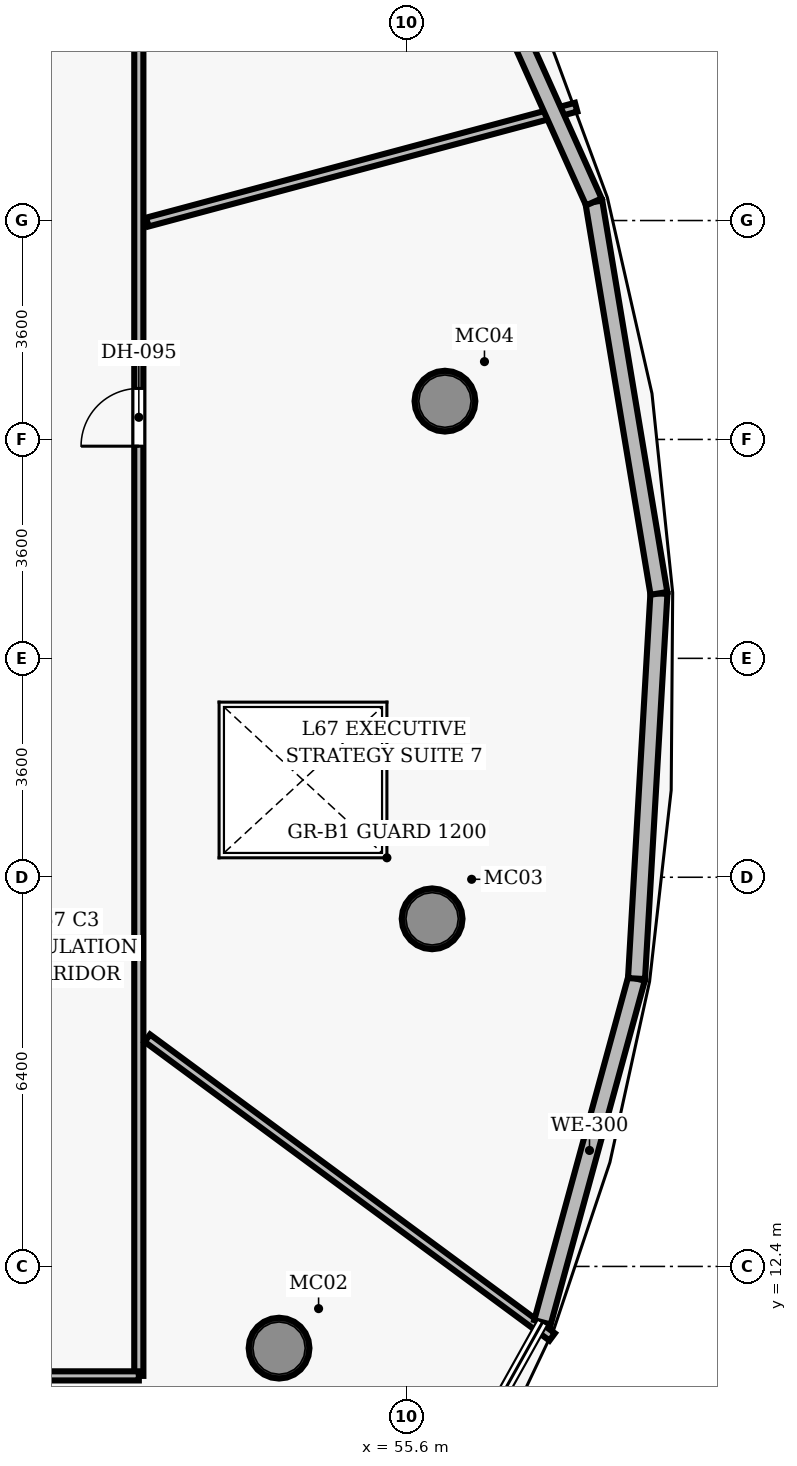
"""IFC4 building model, lengths in metres.
Left out: names, types, materials, properties, quantities, classifications, styles, units other than length and angle.
Written with IfcOpenShell. Run it as: python <this file> out.ifc"""

import sys

from ifc_helpers import new_model, si_unit, direction, frame, frame_2d, origin, origin_2d, place, context, subcontext, project, spatial, rectangle, hollow_circle, extrude, element, fill, save


model = new_model("IFC4")
c1 = context("Model", 3, precision=1e-05, world=origin(), true_north=direction((0.0, 1.0)))
c2 = subcontext(c1, "Body", "Model", "MODEL_VIEW")
j1 = project(units=[si_unit("LENGTHUNIT", "METRE"), si_unit("PLANEANGLEUNIT", "RADIAN")], contexts=[c1])
p1 = place(None, origin())
s1 = spatial("IfcSite", under=j1, at=p1, CompositionType="ELEMENT")
p2 = place(p1, origin())
s2 = spatial("IfcBuilding", under=s1, at=p2, CompositionType="ELEMENT")
p3 = place(p2, frame((0.0, 0.0, 265.15)))
s3 = spatial("IfcBuildingStorey", under=s2, at=p3, CompositionType="ELEMENT", Elevation=265.15)
for number, where, z_axis, x_axis in (
    (1, (53.506, 11.056, 0.0), (0.0, 0.0, 1.0), (1.0, 0.0, 0.0)),
    (2, (56.024, 18.116, 0.0), (0.0, 0.0, 1.0), (1.0, 0.0, 0.0)),
    (3, (56.235, 26.629, 0.0), (0.0, 0.0, 1.0), (1.0, 0.0, 0.0)),
):
    element("IfcColumn", number, at=place(p3, frame(where, z_axis=z_axis, x_axis=x_axis)), inside=s3, PredefinedType="COLUMN", context=c2, shape_type="SweptSolid", body=[
        extrude(hollow_circle(Radius=0.5, WallThickness=0.045, at=origin_2d()), origin(), (0.0, 0.0, 1.0), 3.85),
    ])
p4 = place(p3, frame((51.2, 10.6, 0.0), z_axis=(0.0, 0.0, 1.0), x_axis=(0.0, 1.0, 0.0)))
e4 = element("IfcWall", 4, at=p4, inside=s3, PredefinedType="PARTITIONING", context=c2, shape_type="SweptSolid", body=[
    extrude(rectangle(XDim=30.089, YDim=0.15, at=frame_2d((15.044, 0.0))), origin(), (0.0, 0.0, 1.0), 3.04),
])
p5 = place(p4, frame((26.485, 0.0, 0.0)))
e5 = element("IfcOpeningElement", 5, at=p5, cuts=e4, PredefinedType="OPENING", context=c2, shape_type="SweptSolid", body=[
    extrude(rectangle(XDim=1.5, YDim=2.2, at=frame_2d((0.75, 1.1))), frame((0.0, 0.085, 0.0), z_axis=(0.0, -1.0, 0.0), x_axis=(1.0, 0.0, 0.0)), (0.0, 0.0, 1.0), 0.17),
])
p6 = place(p4, frame((15.289, 0.0, 0.0)))
e6 = element("IfcOpeningElement", 6, at=p6, cuts=e4, PredefinedType="OPENING", context=c2, shape_type="SweptSolid", body=[
    extrude(rectangle(XDim=0.95, YDim=2.15, at=frame_2d((0.475, 1.075))), frame((0.0, 0.085, 0.0), z_axis=(0.0, -1.0, 0.0), x_axis=(1.0, 0.0, 0.0)), (0.0, 0.0, 1.0), 0.17),
])
p7 = place(p3, frame((49.1, 10.6, 0.0), z_axis=(0.0, 0.0, 1.0), x_axis=(1.0, 0.0, 0.0)))
e7 = element("IfcWall", 7, at=p7, inside=s3, PredefinedType="PARTITIONING", context=c2, shape_type="SweptSolid", body=[
    extrude(rectangle(XDim=2.1, YDim=0.15, at=frame_2d((1.05, 0.0))), origin(), (0.0, 0.0, 1.0), 3.04),
])
p8 = place(p3, frame((51.34, 29.574, 0.0), z_axis=(0.0, 0.0, 1.0), x_axis=(0.965925662207, 0.258819657463, 0.0)))
e8 = element("IfcWall", 8, at=p8, inside=s3, PredefinedType="PARTITIONING", context=c2, shape_type="SweptSolid", body=[
    extrude(rectangle(XDim=7.301, YDim=0.15, at=frame_2d((3.65, 0.0))), origin(), (0.0, 0.0, 1.0), 3.04),
])
p9 = place(p3, frame((51.34, 16.155, 0.0), z_axis=(0.0, 0.0, 1.0), x_axis=(0.804600259719, -0.593816825343, 0.0)))
e9 = element("IfcWall", 9, at=p9, inside=s3, PredefinedType="PARTITIONING", context=c2, shape_type="SweptSolid", body=[
    extrude(rectangle(XDim=8.275, YDim=0.15, at=frame_2d((4.137, 0.0))), origin(), (0.0, 0.0, 1.0), 3.04),
])
p10 = place(p3, frame((59.385, 17.134, 0.0), z_axis=(0.0, 0.0, 1.0), x_axis=(-0.264002098422, -0.964522105516, 0.0)))
e10 = element("IfcWall", 10, at=p10, inside=s3, PredefinedType="SOLIDWALL", context=c2, shape_type="SweptSolid", body=[
    extrude(rectangle(XDim=5.86, YDim=0.28, at=frame_2d((2.93, 0.0))), origin(), (0.0, 0.0, 1.0), 3.625),
])
p11 = place(p3, frame((59.754, 23.468, 0.0), z_axis=(0.0, 0.0, 1.0), x_axis=(-0.058061140862, -0.998313029025, 0.0)))
e11 = element("IfcWall", 11, at=p11, inside=s3, PredefinedType="SOLIDWALL", context=c2, shape_type="SweptSolid", body=[
    extrude(rectangle(XDim=6.345, YDim=0.28, at=frame_2d((3.173, 0.0))), origin(), (0.0, 0.0, 1.0), 3.625),
])
p12 = place(p3, frame((58.683, 29.906, 0.0), z_axis=(0.0, 0.0, 1.0), x_axis=(0.164077460274, -0.986447457815, 0.0)))
e12 = element("IfcWall", 12, at=p12, inside=s3, PredefinedType="SOLIDWALL", context=c2, shape_type="SweptSolid", body=[
    extrude(rectangle(XDim=6.526, YDim=0.28, at=frame_2d((3.263, 0.0))), origin(), (0.0, 0.0, 1.0), 3.625),
])
p13 = place(p3, frame((56.011, 35.861, 0.0), z_axis=(0.0, 0.0, 1.0), x_axis=(0.409401707674, -0.912354230414, 0.0)))
e13 = element("IfcWall", 13, at=p13, inside=s3, PredefinedType="SOLIDWALL", context=c2, shape_type="SweptSolid", body=[
    extrude(rectangle(XDim=6.527, YDim=0.28, at=frame_2d((3.263, 0.0))), origin(), (0.0, 0.0, 1.0), 3.625),
])
p14 = place(p6, origin())
e14 = element("IfcDoor", 14, at=p14, inside=s3, OperationType="SINGLE_SWING_LEFT", PredefinedType="DOOR", context=c2, shape_type="SweptSolid", body=[
    extrude(rectangle(XDim=0.95, YDim=2.15, at=frame_2d((0.475, 1.075))), frame((0.0, 0.025, 0.0), z_axis=(0.0, -1.0, 0.0), x_axis=(1.0, 0.0, 0.0)), (0.0, 0.0, 1.0), 0.05),
])
fill(e6, e14)
save(model, sys.argv[1])
